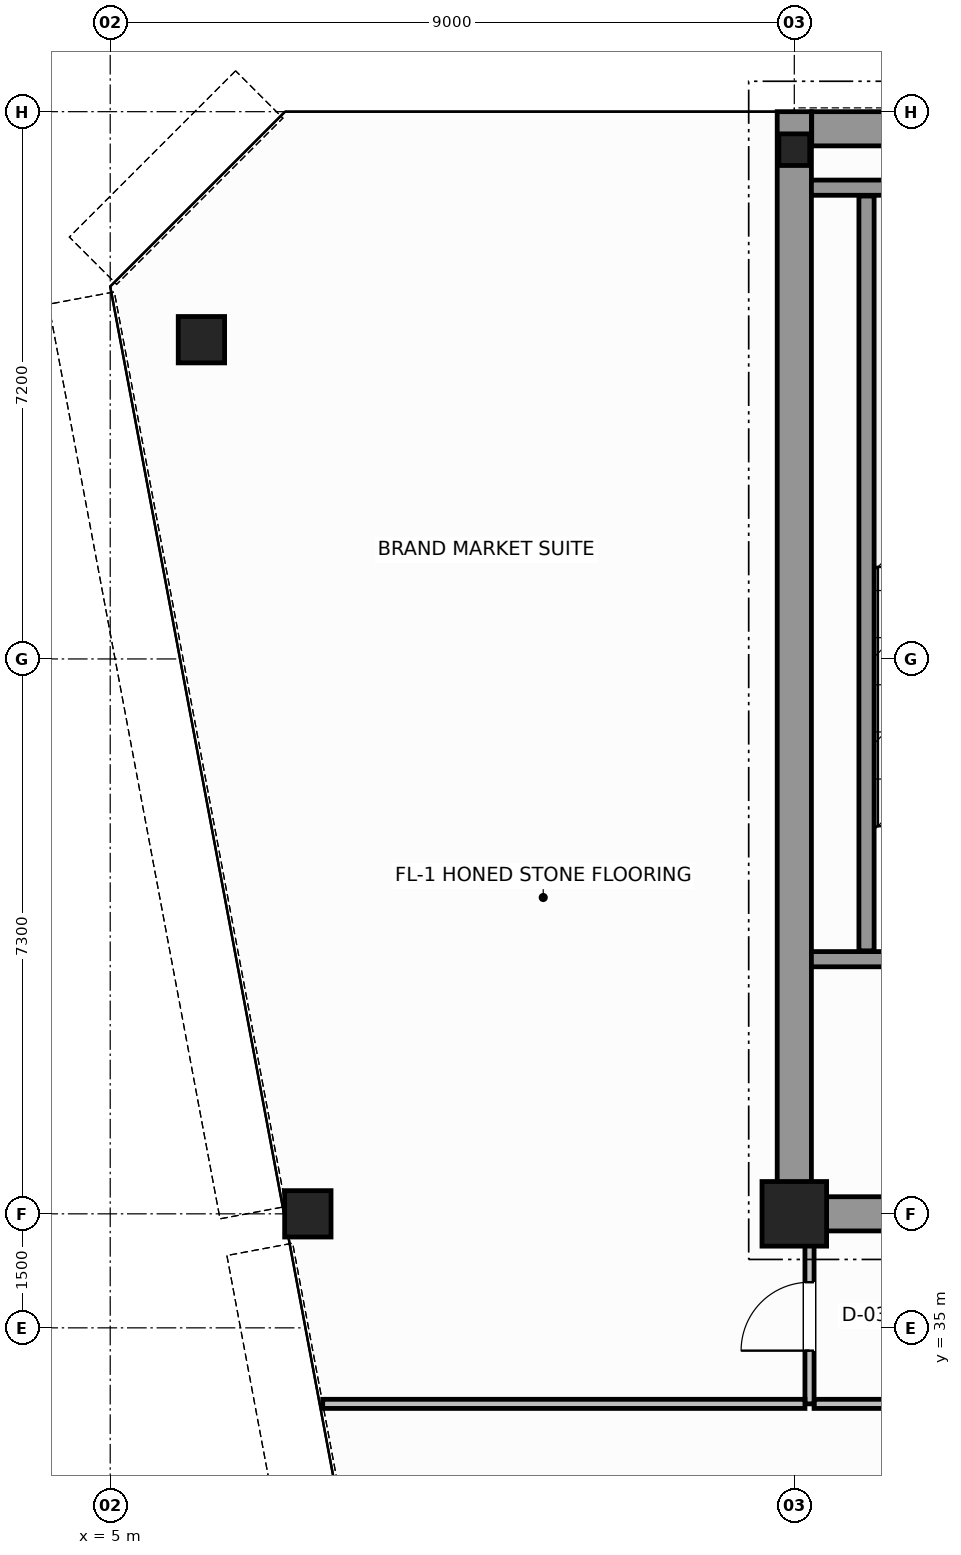
"""IFC4 building model, lengths in metres.
Left out: names, types, materials, properties, quantities, classifications, styles, units other than length and angle.
Written with IfcOpenShell. Run it as: python <this file> out.ifc"""

import sys

from ifc_helpers import new_model, si_unit, direction, frame, frame_2d, origin, origin_2d, place, context, subcontext, project, spatial, rectangle, hollow_circle, i_section, extrude, source, transform, mapped, element, fill, save


model = new_model("IFC4")
c1 = context("Model", 3, precision=1e-05, world=origin(), true_north=direction((0.0, 1.0)))
c2 = subcontext(c1, "Body", "Model", "MODEL_VIEW")
j1 = project(units=[si_unit("LENGTHUNIT", "METRE"), si_unit("PLANEANGLEUNIT", "RADIAN")], contexts=[c1])
p1 = place(None, origin())
s1 = spatial("IfcSite", under=j1, at=p1, CompositionType="ELEMENT")
p2 = place(p1, origin())
s2 = spatial("IfcBuilding", under=s1, at=p2, CompositionType="ELEMENT")
p3 = place(p2, frame((0.0, 0.0, 291.6)))
s3 = spatial("IfcBuildingStorey", under=s2, at=p3, CompositionType="ELEMENT", Elevation=291.6)
m1 = source(origin(), c2, "Body", "SweptSolid", [
    extrude(rectangle(XDim=0.85, YDim=0.85, at=origin_2d()), origin(), (0.0, 0.0, 1.0), 3.8),
])
p4 = place(p3, frame((14.0, 36.5, 0.0), z_axis=(0.0, 0.0, 1.0), x_axis=(1.0, 0.0, 0.0)))
e1 = element("IfcColumn", 1, at=p4, inside=s3, PredefinedType="COLUMN", context=c2, shape_type="MappedRepresentation", body=[
    mapped(m1, transform((0.0, 0.0, 0.0), scale=1.0)),
])
m2 = source(origin(), c2, "Body", "SweptSolid", [
    extrude(i_section(OverallWidth=0.406, OverallDepth=0.416, WebThickness=0.03, FlangeThickness=0.042, FilletRadius=0.015, at=origin_2d()), origin(), (0.0, 0.0, 1.0), 3.8),
])
p5 = place(p3, frame((14.0, 50.5, 0.0), z_axis=(0.0, 0.0, 1.0), x_axis=(1.0, 0.0, 0.0)))
e2 = element("IfcColumn", 2, at=p5, inside=s3, PredefinedType="COLUMN", context=c2, shape_type="MappedRepresentation", body=[
    mapped(m2, transform((0.0, 0.0, 0.0), scale=1.0)),
])
m3 = source(origin(), c2, "Body", "SweptSolid", [
    extrude(hollow_circle(Radius=0.305, WallThickness=0.03, at=origin_2d()), origin(), (0.0, 0.0, 1.0), 3.8),
])
for number, where, z_axis, x_axis in (
    (3, (6.2, 48.0, 0.0), (0.0, 0.0, 1.0), (1.0, 0.0, 0.0)),
    (4, (7.6, 36.5, 0.0), (0.0, 0.0, 1.0), (1.0, 0.0, 0.0)),
):
    element("IfcColumn", number, at=place(p3, frame(where, z_axis=z_axis, x_axis=x_axis)), inside=s3, PredefinedType="COLUMN", context=c2, shape_type="MappedRepresentation", body=[
        mapped(m3, transform((0.0, 0.0, 0.0), scale=1.0)),
    ])
p6 = place(p3, frame((14.229, 50.775, 0.0), z_axis=(0.0, 0.0, 1.0), x_axis=(1.0, 0.0, 0.0)))
e5 = element("IfcWall", 5, at=p6, inside=s3, PredefinedType="SHEAR", context=c2, shape_type="SweptSolid", body=[
    extrude(rectangle(XDim=19.769, YDim=0.45, at=frame_2d((9.885, 0.0))), origin(), (0.0, 0.0, 1.0), 3.8),
])
p7 = place(p3, frame((14.0, 36.5, 0.0), z_axis=(0.0, 0.0, 1.0), x_axis=(0.0, 1.0, 0.0)))
e6 = element("IfcWall", 6, at=p7, inside=s3, PredefinedType="SHEAR", context=c2, shape_type="SweptSolid", body=[
    extrude(rectangle(XDim=14.5, YDim=0.45, at=frame_2d((7.25, 0.0))), origin(), (0.0, 0.0, 1.0), 3.8),
])
p8 = place(p3, frame((14.245, 36.5, 0.0), z_axis=(0.0, 0.0, 1.0), x_axis=(1.0, 0.0, 0.0)))
e7 = element("IfcWall", 7, at=p8, inside=s3, PredefinedType="SHEAR", context=c2, shape_type="SweptSolid", body=[
    extrude(rectangle(XDim=3.955, YDim=0.45, at=frame_2d((1.978, 0.0))), origin(), (0.0, 0.0, 1.0), 2.58),
])
p9 = place(p3, frame((14.225, 39.85, 0.0), z_axis=(0.0, 0.0, 1.0), x_axis=(1.0, 0.0, 0.0)))
e8 = element("IfcWall", 8, at=p9, inside=s3, PredefinedType="SOLIDWALL", context=c2, shape_type="SweptSolid", body=[
    extrude(rectangle(XDim=4.375, YDim=0.2, at=frame_2d((2.188, 0.0))), origin(), (0.0, 0.0, 1.0), 3.8),
])
p10 = place(p9, frame((1.95, 0.0, 0.0)))
e9 = element("IfcOpeningElement", 9, at=p10, cuts=e8, PredefinedType="OPENING", context=c2, shape_type="SweptSolid", body=[
    extrude(rectangle(XDim=1.1, YDim=2.15, at=frame_2d((0.55, 1.075))), frame((0.0, 0.11, 0.0), z_axis=(0.0, -1.0, 0.0), x_axis=(1.0, 0.0, 0.0)), (0.0, 0.0, 1.0), 0.22),
])
p11 = place(p3, frame((14.225, 50.0, 0.0), z_axis=(0.0, 0.0, 1.0), x_axis=(1.0, 0.0, 0.0)))
e10 = element("IfcWall", 10, at=p11, inside=s3, PredefinedType="SOLIDWALL", context=c2, shape_type="SweptSolid", body=[
    extrude(rectangle(XDim=4.375, YDim=0.2, at=frame_2d((2.188, 0.0))), origin(), (0.0, 0.0, 1.0), 3.8),
])
p12 = place(p3, frame((14.95, 39.96, 0.0), z_axis=(0.0, 0.0, 1.0), x_axis=(0.0, 1.0, 0.0)))
e11 = element("IfcWall", 11, at=p12, inside=s3, PredefinedType="SOLIDWALL", context=c2, shape_type="SweptSolid", body=[
    extrude(rectangle(XDim=9.93, YDim=0.2, at=frame_2d((4.965, 0.0))), origin(), (0.0, 0.0, 1.0), 3.8),
])
p13 = place(p3, frame((14.26, 34.0, 0.0), z_axis=(0.0, 0.0, 1.0), x_axis=(1.0, 0.0, 0.0)))
e12 = element("IfcWall", 12, at=p13, inside=s3, PredefinedType="PARTITIONING", context=c2, shape_type="SweptSolid", body=[
    extrude(rectangle(XDim=18.08, YDim=0.12, at=frame_2d((9.04, 0.0))), origin(), (0.0, 0.0, 1.0), 3.58),
])
p14 = place(p3, frame((14.2, 34.0, 0.0), z_axis=(0.0, 0.0, 1.0), x_axis=(0.0, 1.0, 0.0)))
e13 = element("IfcWall", 13, at=p14, inside=s3, PredefinedType="PARTITIONING", context=c2, shape_type="SweptSolid", body=[
    extrude(rectangle(XDim=2.44, YDim=0.12, at=frame_2d((1.22, 0.0))), origin(), (0.0, 0.0, 1.0), 3.58),
])
p15 = place(p14, frame((0.7, 0.0, 0.0)))
e14 = element("IfcOpeningElement", 14, at=p15, cuts=e13, PredefinedType="OPENING", context=c2, shape_type="SweptSolid", body=[
    extrude(rectangle(XDim=0.9, YDim=2.15, at=frame_2d((0.45, 1.075))), frame((0.0, 0.07, 0.0), z_axis=(0.0, -1.0, 0.0), x_axis=(1.0, 0.0, 0.0)), (0.0, 0.0, 1.0), 0.14),
])
p16 = place(p3, frame((7.796, 34.0, 0.0), z_axis=(0.0, 0.0, 1.0), x_axis=(1.0, 0.0, 0.0)))
e15 = element("IfcWall", 15, at=p16, inside=s3, PredefinedType="PARTITIONING", context=c2, shape_type="SweptSolid", body=[
    extrude(rectangle(XDim=6.344, YDim=0.12, at=frame_2d((3.172, 0.0))), origin(), (0.0, 0.0, 1.0), 3.58),
])
m4 = source(origin(), c2, "Body", "SweptSolid", [
    extrude(rectangle(XDim=0.9, YDim=2.15, at=frame_2d((0.45, 1.075))), frame((0.0, 0.025, 0.0), z_axis=(0.0, -1.0, 0.0), x_axis=(1.0, 0.0, 0.0)), (0.0, 0.0, 1.0), 0.05),
])
p17 = place(p15, origin())
e16 = element("IfcDoor", 16, at=p17, inside=s3, OperationType="SINGLE_SWING_LEFT", PredefinedType="DOOR", context=c2, shape_type="MappedRepresentation", body=[
    mapped(m4, transform((0.0, 0.0, 0.0), scale=1.0)),
])
fill(e14, e16)
save(model, sys.argv[1])
